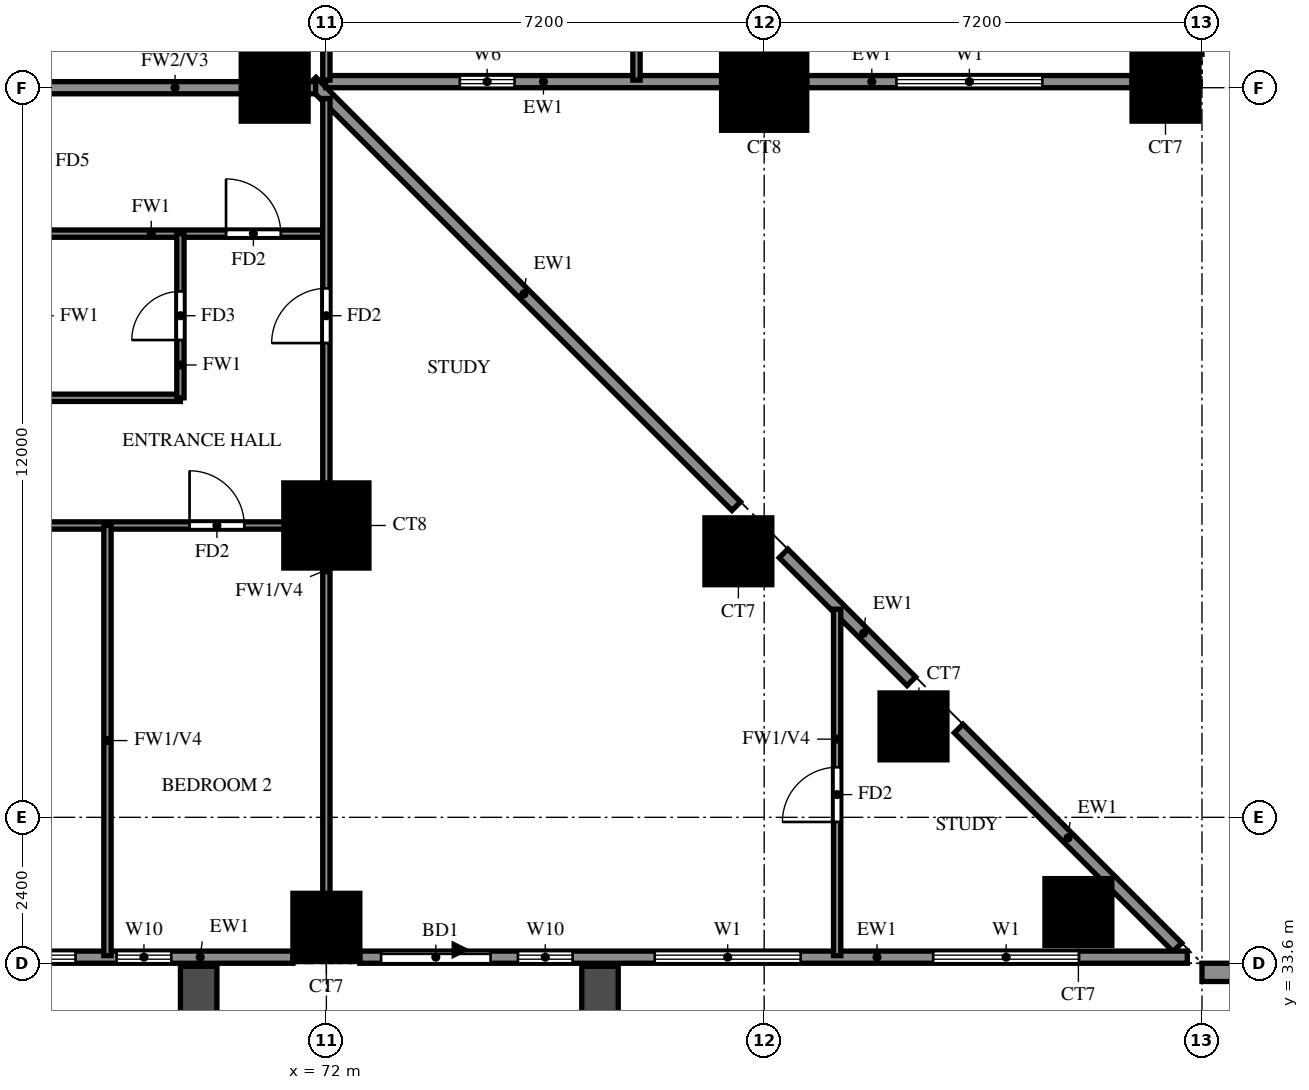
"""IFC4 building model, lengths in metres.
Left out: names, types, materials, properties, quantities, classifications, styles, units other than length and angle.
Written with IfcOpenShell. Run it as: python <this file> out.ifc"""

import sys

from ifc_helpers import new_model, si_unit, direction, frame, frame_2d, origin, origin_2d, place, context, subcontext, project, spatial, rectangle, extrude, source, transform, mapped, element, fill, save


model = new_model("IFC4")
c1 = context("Model", 3, precision=1e-05, world=origin(), true_north=direction((0.0, 1.0)))
c2 = subcontext(c1, "Body", "Model", "MODEL_VIEW")
j1 = project(units=[si_unit("LENGTHUNIT", "METRE"), si_unit("PLANEANGLEUNIT", "RADIAN")], contexts=[c1])
p1 = place(None, origin())
s1 = spatial("IfcSite", under=j1, at=p1, CompositionType="ELEMENT")
p2 = place(p1, origin())
s2 = spatial("IfcBuilding", under=s1, at=p2, CompositionType="ELEMENT")
p3 = place(p2, frame((0.0, 0.0, 30.5)))
s3 = spatial("IfcBuildingStorey", under=s2, at=p3, CompositionType="ELEMENT", Elevation=30.5)
m1 = source(origin(), c2, "Body", "SweptSolid", [
    extrude(rectangle(XDim=1.1, YDim=1.1, at=origin_2d()), origin(), (0.0, 0.0, 1.0), 3.18),
])
for number, where, z_axis, x_axis in (
    (1, (72.0, 34.2, 0.0), (0.0, 0.0, 1.0), (1.0, 0.0, 0.0)),
    (2, (84.367, 34.442, 0.0), (0.0, 0.0, 1.0), (1.0, 0.0, 0.0)),
    (3, (81.656, 37.496, 0.0), (0.0, 0.0, 1.0), (1.0, 0.0, 0.0)),
    (4, (78.776, 40.376, 0.0), (0.0, 0.0, 1.0), (1.0, 0.0, 0.0)),
):
    element("IfcColumn", number, at=place(p3, frame(where, z_axis=z_axis, x_axis=x_axis)), inside=s3, PredefinedType="COLUMN", context=c2, shape_type="MappedRepresentation", body=[
        mapped(m1, transform((0.0, 0.0, 0.0))),
    ])
m2 = source(origin(), c2, "Body", "SweptSolid", [
    extrude(rectangle(XDim=1.4, YDim=1.4, at=origin_2d()), origin(), (0.0, 0.0, 1.0), 3.18),
])
p4 = place(p3, frame((72.0, 40.8, 0.0), z_axis=(0.0, 0.0, 1.0), x_axis=(1.0, 0.0, 0.0)))
e5 = element("IfcColumn", 5, at=p4, inside=s3, PredefinedType="COLUMN", context=c2, shape_type="MappedRepresentation", body=[
    mapped(m2, transform((0.0, 0.0, 0.0))),
])
p5 = place(p3, frame((71.15, 48.0, 0.0), z_axis=(0.0, 0.0, 1.0), x_axis=(1.0, 0.0, 0.0)))
e6 = element("IfcColumn", 6, at=p5, inside=s3, PredefinedType="COLUMN", context=c2, shape_type="MappedRepresentation", body=[
    mapped(m1, transform((0.0, 0.0, 0.0))),
])
p6 = place(p3, frame((79.2, 48.0, 0.0), z_axis=(0.0, 0.0, 1.0), x_axis=(1.0, 0.0, 0.0)))
e7 = element("IfcColumn", 7, at=p6, inside=s3, PredefinedType="COLUMN", context=c2, shape_type="MappedRepresentation", body=[
    mapped(m2, transform((0.0, 0.0, 0.0))),
])
p7 = place(p3, frame((85.8, 48.0, 0.0), z_axis=(0.0, 0.0, 1.0), x_axis=(1.0, 0.0, 0.0)))
e8 = element("IfcColumn", 8, at=p7, inside=s3, PredefinedType="COLUMN", context=c2, shape_type="MappedRepresentation", body=[
    mapped(m1, transform((0.0, 0.0, 0.0))),
])
p8 = place(p3, frame((85.996, 33.863, 0.0), z_axis=(0.0, 0.0, 1.0), x_axis=(-0.7070827891, 0.707130772459, 0.0)))
e9 = element("IfcWall", 9, at=p8, inside=s3, PredefinedType="SOLIDWALL", context=c2, shape_type="SweptSolid", body=[
    extrude(rectangle(XDim=5.088, YDim=0.2, at=frame_2d((2.544, 0.0))), origin(), (0.0, 0.0, 1.0), 3.18),
])
p9 = place(p3, frame((81.62, 38.238, 0.0), z_axis=(0.0, 0.0, 1.0), x_axis=(-0.707106781187, 0.707106781187, 0.0)))
e10 = element("IfcWall", 10, at=p9, inside=s3, PredefinedType="SOLIDWALL", context=c2, shape_type="SweptSolid", body=[
    extrude(rectangle(XDim=2.973, YDim=0.2, at=frame_2d((1.486, 0.0))), origin(), (0.0, 0.0, 1.0), 3.18),
])
p10 = place(p3, frame((78.74, 41.118, 0.0), z_axis=(0.0, 0.0, 1.0), x_axis=(-0.707106781187, 0.707106781187, 0.0)))
e11 = element("IfcWall", 11, at=p10, inside=s3, PredefinedType="SOLIDWALL", context=c2, shape_type="SweptSolid", body=[
    extrude(rectangle(XDim=9.874, YDim=0.2, at=frame_2d((4.937, 0.0))), origin(), (0.0, 0.0, 1.0), 3.18),
])
p11 = place(p3, frame((71.989, 48.1, 0.0), z_axis=(0.0, 0.0, 1.0), x_axis=(1.0, 0.0, 0.0)))
e12 = element("IfcWall", 12, at=p11, inside=s3, PredefinedType="SOLIDWALL", context=c2, shape_type="SweptSolid", body=[
    extrude(rectangle(XDim=6.511, YDim=0.2, at=frame_2d((3.256, 0.0))), origin(), (0.0, 0.0, 1.0), 3.18),
])
p12 = place(p11, frame((2.206, 0.0, 1.5)))
e13 = element("IfcOpeningElement", 13, at=p12, cuts=e12, PredefinedType="OPENING", context=c2, shape_type="SweptSolid", body=[
    extrude(rectangle(XDim=0.9, YDim=0.9, at=frame_2d((0.45, 0.45))), frame((0.0, 0.11, 0.0), z_axis=(0.0, -1.0, 0.0), x_axis=(1.0, 0.0, 0.0)), (0.0, 0.0, 1.0), 0.22),
])
p13 = place(p3, frame((79.9, 48.1, 0.0), z_axis=(0.0, 0.0, 1.0), x_axis=(1.0, 0.0, 0.0)))
e14 = element("IfcWall", 14, at=p13, inside=s3, PredefinedType="SOLIDWALL", context=c2, shape_type="SweptSolid", body=[
    extrude(rectangle(XDim=5.35, YDim=0.2, at=frame_2d((2.675, 0.0))), origin(), (0.0, 0.0, 1.0), 3.18),
])
p14 = place(p13, frame((1.475, 0.0, 0.6)))
e15 = element("IfcOpeningElement", 15, at=p14, cuts=e14, PredefinedType="OPENING", context=c2, shape_type="SweptSolid", body=[
    extrude(rectangle(XDim=2.4, YDim=2.4, at=frame_2d((1.2, 1.2))), frame((0.0, 0.11, 0.0), z_axis=(0.0, -1.0, 0.0), x_axis=(1.0, 0.0, 0.0)), (0.0, 0.0, 1.0), 0.22),
])
p15 = place(p3, frame((86.3, 48.55, 0.0), z_axis=(0.0, 0.0, 1.0), x_axis=(0.0, 1.0, 0.0)))
e16 = element("IfcWall", 16, at=p15, inside=s3, PredefinedType="SOLIDWALL", context=c2, shape_type="SweptSolid", body=[
    extrude(rectangle(XDim=6.1, YDim=0.2, at=frame_2d((3.05, 0.0))), origin(), (0.0, 0.0, 1.0), 3.18),
])
p16 = place(p15, frame((0.725, 0.0, 0.6)))
e17 = element("IfcOpeningElement", 17, at=p16, cuts=e16, PredefinedType="OPENING", context=c2, shape_type="SweptSolid", body=[
    extrude(rectangle(XDim=1.8, YDim=2.4, at=frame_2d((0.9, 1.2))), frame((0.0, 0.11, 0.0), z_axis=(0.0, -1.0, 0.0), x_axis=(1.0, 0.0, 0.0)), (0.0, 0.0, 1.0), 0.22),
])
p17 = place(p15, frame((4.025, 0.0, 1.5)))
e18 = element("IfcOpeningElement", 18, at=p17, cuts=e16, PredefinedType="OPENING", context=c2, shape_type="SweptSolid", body=[
    extrude(rectangle(XDim=0.9, YDim=0.9, at=frame_2d((0.45, 0.45))), frame((0.0, 0.11, 0.0), z_axis=(0.0, -1.0, 0.0), x_axis=(1.0, 0.0, 0.0)), (0.0, 0.0, 1.0), 0.22),
])
p18 = place(p3, frame((65.35, 33.7, 0.0), z_axis=(0.0, 0.0, 1.0), x_axis=(1.0, 0.0, 0.0)))
e19 = element("IfcWall", 19, at=p18, inside=s3, PredefinedType="SOLIDWALL", context=c2, shape_type="SweptSolid", body=[
    extrude(rectangle(XDim=6.1, YDim=0.2, at=frame_2d((3.05, 0.0))), origin(), (0.0, 0.0, 1.0), 3.18),
])
p19 = place(p18, frame((3.2, 0.0, 0.6)))
e20 = element("IfcOpeningElement", 20, at=p19, cuts=e19, PredefinedType="OPENING", context=c2, shape_type="SweptSolid", body=[
    extrude(rectangle(XDim=0.9, YDim=2.4, at=frame_2d((0.45, 1.2))), frame((0.0, 0.11, 0.0), z_axis=(0.0, -1.0, 0.0), x_axis=(1.0, 0.0, 0.0)), (0.0, 0.0, 1.0), 0.22),
])
p20 = place(p18, frame((0.725, 0.0, 0.6)))
e21 = element("IfcOpeningElement", 21, at=p20, cuts=e19, PredefinedType="OPENING", context=c2, shape_type="SweptSolid", body=[
    extrude(rectangle(XDim=1.8, YDim=2.4, at=frame_2d((0.9, 1.2))), frame((0.0, 0.11, 0.0), z_axis=(0.0, -1.0, 0.0), x_axis=(1.0, 0.0, 0.0)), (0.0, 0.0, 1.0), 0.22),
])
p21 = place(p3, frame((72.55, 33.7, 0.0), z_axis=(0.0, 0.0, 1.0), x_axis=(1.0, 0.0, 0.0)))
e22 = element("IfcWall", 22, at=p21, inside=s3, PredefinedType="SOLIDWALL", context=c2, shape_type="SweptSolid", body=[
    extrude(rectangle(XDim=13.609, YDim=0.2, at=frame_2d((6.804, 0.0))), origin(), (0.0, 0.0, 1.0), 3.18),
])
p22 = place(p21, frame((0.35, 0.0, 0.0)))
e23 = element("IfcOpeningElement", 23, at=p22, cuts=e22, PredefinedType="OPENING", context=c2, shape_type="SweptSolid", body=[
    extrude(rectangle(XDim=1.8, YDim=2.4, at=frame_2d((0.9, 1.2))), frame((0.0, 0.11, 0.0), z_axis=(0.0, -1.0, 0.0), x_axis=(1.0, 0.0, 0.0)), (0.0, 0.0, 1.0), 0.22),
])
p23 = place(p21, frame((2.6, 0.0, 0.6)))
e24 = element("IfcOpeningElement", 24, at=p23, cuts=e22, PredefinedType="OPENING", context=c2, shape_type="SweptSolid", body=[
    extrude(rectangle(XDim=0.9, YDim=2.4, at=frame_2d((0.45, 1.2))), frame((0.0, 0.11, 0.0), z_axis=(0.0, -1.0, 0.0), x_axis=(1.0, 0.0, 0.0)), (0.0, 0.0, 1.0), 0.22),
])
p24 = place(p21, frame((4.85, 0.0, 0.6)))
e25 = element("IfcOpeningElement", 25, at=p24, cuts=e22, PredefinedType="OPENING", context=c2, shape_type="SweptSolid", body=[
    extrude(rectangle(XDim=2.4, YDim=2.4, at=frame_2d((1.2, 1.2))), frame((0.0, 0.11, 0.0), z_axis=(0.0, -1.0, 0.0), x_axis=(1.0, 0.0, 0.0)), (0.0, 0.0, 1.0), 0.22),
])
p25 = place(p21, frame((9.429, 0.0, 0.6)))
e26 = element("IfcOpeningElement", 26, at=p25, cuts=e22, PredefinedType="OPENING", context=c2, shape_type="SweptSolid", body=[
    extrude(rectangle(XDim=2.4, YDim=2.4, at=frame_2d((1.2, 1.2))), frame((0.0, 0.11, 0.0), z_axis=(0.0, -1.0, 0.0), x_axis=(1.0, 0.0, 0.0)), (0.0, 0.0, 1.0), 0.22),
])
p26 = place(p3, frame((86.4, 33.45, -0.32), z_axis=(0.0, 0.0, 1.0), x_axis=(1.0, 0.0, 0.0)))
e27 = element("IfcWall", 27, at=p26, inside=s3, PredefinedType="SOLIDWALL", context=c2, shape_type="SweptSolid", body=[
    extrude(rectangle(XDim=2.4, YDim=0.3, at=frame_2d((1.2, 0.0))), origin(), (0.0, 0.0, 1.0), 3.5),
])
for number, where, z_axis, x_axis in (
    (28, (69.9, 33.55, 0.0), (0.0, 0.0, 1.0), (0.0, -1.0, 0.0)),
    (29, (76.5, 33.55, 0.0), (0.0, 0.0, 1.0), (0.0, -1.0, 0.0)),
):
    element("IfcWall", number, at=place(p3, frame(where, z_axis=z_axis, x_axis=x_axis)), inside=s3, PredefinedType="SOLIDWALL", context=c2, shape_type="SweptSolid", body=[
        extrude(rectangle(XDim=2.65, YDim=0.6, at=frame_2d((1.325, 0.0))), origin(), (0.0, 0.0, 1.0), 2.85),
    ])
p27 = place(p3, frame((67.2, 48.0, 0.0), z_axis=(0.0, 0.0, 1.0), x_axis=(1.0, 0.0, 0.0)))
e30 = element("IfcWall", 30, at=p27, inside=s3, PredefinedType="SOLIDWALL", context=c2, shape_type="SweptSolid", body=[
    extrude(rectangle(XDim=4.623, YDim=0.2, at=frame_2d((2.312, 0.0))), origin(), (0.0, 0.0, 1.0), 3.18),
])
p28 = place(p3, frame((60.0, 40.8, 0.0), z_axis=(0.0, 0.0, 1.0), x_axis=(1.0, 0.0, 0.0)))
e31 = element("IfcWall", 31, at=p28, inside=s3, PredefinedType="PARTITIONING", context=c2, shape_type="SweptSolid", body=[
    extrude(rectangle(XDim=12.0, YDim=0.12, at=frame_2d((6.0, 0.0))), origin(), (0.0, 0.0, 1.0), 3.18),
])
p29 = place(p28, frame((9.75, 0.0, 0.0)))
e32 = element("IfcOpeningElement", 32, at=p29, cuts=e31, PredefinedType="OPENING", context=c2, shape_type="SweptSolid", body=[
    extrude(rectangle(XDim=0.9, YDim=2.1, at=frame_2d((0.45, 1.05))), frame((0.0, 0.07, 0.0), z_axis=(0.0, -1.0, 0.0), x_axis=(1.0, 0.0, 0.0)), (0.0, 0.0, 1.0), 0.14),
])
p30 = place(p28, frame((2.55, 0.0, 0.0)))
e33 = element("IfcOpeningElement", 33, at=p30, cuts=e31, PredefinedType="OPENING", context=c2, shape_type="SweptSolid", body=[
    extrude(rectangle(XDim=1.5, YDim=2.1, at=frame_2d((0.75, 1.05))), frame((0.0, 0.07, 0.0), z_axis=(0.0, -1.0, 0.0), x_axis=(1.0, 0.0, 0.0)), (0.0, 0.0, 1.0), 0.14),
])
p31 = place(p3, frame((60.0, 42.9, 0.0), z_axis=(0.0, 0.0, 1.0), x_axis=(1.0, 0.0, 0.0)))
e34 = element("IfcWall", 34, at=p31, inside=s3, PredefinedType="PARTITIONING", context=c2, shape_type="SweptSolid", body=[
    extrude(rectangle(XDim=9.6, YDim=0.12, at=frame_2d((4.8, 0.0))), origin(), (0.0, 0.0, 1.0), 3.18),
])
p32 = place(p31, frame((4.4, 0.0, 0.0)))
e35 = element("IfcOpeningElement", 35, at=p32, cuts=e34, PredefinedType="OPENING", context=c2, shape_type="SweptSolid", body=[
    extrude(rectangle(XDim=0.9, YDim=2.1, at=frame_2d((0.45, 1.05))), frame((0.0, 0.07, 0.0), z_axis=(0.0, -1.0, 0.0), x_axis=(1.0, 0.0, 0.0)), (0.0, 0.0, 1.0), 0.14),
])
p33 = place(p31, frame((0.825, 0.0, 0.0)))
e36 = element("IfcOpeningElement", 36, at=p33, cuts=e34, PredefinedType="OPENING", context=c2, shape_type="SweptSolid", body=[
    extrude(rectangle(XDim=0.8, YDim=2.1, at=frame_2d((0.4, 1.05))), frame((0.0, 0.07, 0.0), z_axis=(0.0, -1.0, 0.0), x_axis=(1.0, 0.0, 0.0)), (0.0, 0.0, 1.0), 0.14),
])
p34 = place(p3, frame((67.2, 45.6, 0.0), z_axis=(0.0, 0.0, 1.0), x_axis=(1.0, 0.0, 0.0)))
e37 = element("IfcWall", 37, at=p34, inside=s3, PredefinedType="PARTITIONING", context=c2, shape_type="SweptSolid", body=[
    extrude(rectangle(XDim=4.8, YDim=0.12, at=frame_2d((2.4, 0.0))), origin(), (0.0, 0.0, 1.0), 3.18),
])
p35 = place(p34, frame((3.15, 0.0, 0.0)))
e38 = element("IfcOpeningElement", 38, at=p35, cuts=e37, PredefinedType="OPENING", context=c2, shape_type="SweptSolid", body=[
    extrude(rectangle(XDim=0.9, YDim=2.1, at=frame_2d((0.45, 1.05))), frame((0.0, 0.07, 0.0), z_axis=(0.0, -1.0, 0.0), x_axis=(1.0, 0.0, 0.0)), (0.0, 0.0, 1.0), 0.14),
])
p36 = place(p3, frame((68.4, 33.725, 0.0), z_axis=(0.0, 0.0, 1.0), x_axis=(0.0, 1.0, 0.0)))
e39 = element("IfcWall", 39, at=p36, inside=s3, PredefinedType="PARTITIONING", context=c2, shape_type="SweptSolid", body=[
    extrude(rectangle(XDim=7.075, YDim=0.12, at=frame_2d((3.538, 0.0))), origin(), (0.0, 0.0, 1.0), 2.28),
])
p37 = place(p3, frame((69.6, 42.9, 0.0), z_axis=(0.0, 0.0, 1.0), x_axis=(0.0, 1.0, 0.0)))
e40 = element("IfcWall", 40, at=p37, inside=s3, PredefinedType="PARTITIONING", context=c2, shape_type="SweptSolid", body=[
    extrude(rectangle(XDim=2.7, YDim=0.12, at=frame_2d((1.35, 0.0))), origin(), (0.0, 0.0, 1.0), 3.18),
])
p38 = place(p37, frame((0.95, 0.0, 0.0)))
e41 = element("IfcOpeningElement", 41, at=p38, cuts=e40, PredefinedType="OPENING", context=c2, shape_type="SweptSolid", body=[
    extrude(rectangle(XDim=0.8, YDim=2.1, at=frame_2d((0.4, 1.05))), frame((0.0, 0.07, 0.0), z_axis=(0.0, -1.0, 0.0), x_axis=(1.0, 0.0, 0.0)), (0.0, 0.0, 1.0), 0.14),
])
p39 = place(p3, frame((72.0, 33.725, 0.0), z_axis=(0.0, 0.0, 1.0), x_axis=(0.0, 1.0, 0.0)))
e42 = element("IfcWall", 42, at=p39, inside=s3, PredefinedType="PARTITIONING", context=c2, shape_type="SweptSolid", body=[
    extrude(rectangle(XDim=14.098, YDim=0.12, at=frame_2d((7.049, 0.0))), origin(), (0.0, 0.0, 1.0), 2.28),
])
p40 = place(p39, frame((10.075, 0.0, 0.0)))
e43 = element("IfcOpeningElement", 43, at=p40, cuts=e42, PredefinedType="OPENING", context=c2, shape_type="SweptSolid", body=[
    extrude(rectangle(XDim=0.9, YDim=2.1, at=frame_2d((0.45, 1.05))), frame((0.0, 0.07, 0.0), z_axis=(0.0, -1.0, 0.0), x_axis=(1.0, 0.0, 0.0)), (0.0, 0.0, 1.0), 0.14),
])
for number, where, z_axis, x_axis in (
    (44, (72.0, 48.125, 0.0), (0.0, 0.0, 1.0), (0.0, 1.0, 0.0)),
    (45, (77.1, 48.125, 0.0), (0.0, 0.0, 1.0), (0.0, 1.0, 0.0)),
):
    element("IfcWall", number, at=place(p3, frame(where, z_axis=z_axis, x_axis=x_axis)), inside=s3, PredefinedType="PARTITIONING", context=c2, shape_type="SweptSolid", body=[
        extrude(rectangle(XDim=3.475, YDim=0.12, at=frame_2d((1.738, 0.0))), origin(), (0.0, 0.0, 1.0), 3.18),
    ])
p41 = place(p3, frame((79.2, 48.125, 0.0), z_axis=(0.0, 0.0, 1.0), x_axis=(0.0, 1.0, 0.0)))
e46 = element("IfcWall", 46, at=p41, inside=s3, PredefinedType="PARTITIONING", context=c2, shape_type="SweptSolid", body=[
    extrude(rectangle(XDim=3.475, YDim=0.12, at=frame_2d((1.738, 0.0))), origin(), (0.0, 0.0, 1.0), 3.18),
])
p42 = place(p41, frame((1.288, 0.0, 0.0)))
e47 = element("IfcOpeningElement", 47, at=p42, cuts=e46, PredefinedType="OPENING", context=c2, shape_type="SweptSolid", body=[
    extrude(rectangle(XDim=0.9, YDim=2.1, at=frame_2d((0.45, 1.05))), frame((0.0, 0.07, 0.0), z_axis=(0.0, -1.0, 0.0), x_axis=(1.0, 0.0, 0.0)), (0.0, 0.0, 1.0), 0.14),
])
p43 = place(p3, frame((80.4, 33.725, 0.0), z_axis=(0.0, 0.0, 1.0), x_axis=(0.0, 1.0, 0.0)))
e48 = element("IfcWall", 48, at=p43, inside=s3, PredefinedType="PARTITIONING", context=c2, shape_type="SweptSolid", body=[
    extrude(rectangle(XDim=5.698, YDim=0.12, at=frame_2d((2.849, 0.0))), origin(), (0.0, 0.0, 1.0), 2.28),
])
p44 = place(p43, frame((2.199, 0.0, 0.0)))
e49 = element("IfcOpeningElement", 49, at=p44, cuts=e48, PredefinedType="OPENING", context=c2, shape_type="SweptSolid", body=[
    extrude(rectangle(XDim=0.9, YDim=2.1, at=frame_2d((0.45, 1.05))), frame((0.0, 0.07, 0.0), z_axis=(0.0, -1.0, 0.0), x_axis=(1.0, 0.0, 0.0)), (0.0, 0.0, 1.0), 0.14),
])
p45 = place(p12, origin())
e50 = element("IfcWindow", 50, at=p45, inside=s3, PartitioningType="SINGLE_PANEL", PredefinedType="WINDOW", context=c2, shape_type="SweptSolid", body=[
    extrude(rectangle(XDim=0.9, YDim=0.9, at=frame_2d((0.45, 0.45))), frame((0.0, 0.03, 0.0), z_axis=(0.0, -1.0, 0.0), x_axis=(1.0, 0.0, 0.0)), (0.0, 0.0, 1.0), 0.06),
])
fill(e13, e50)
p46 = place(p14, origin())
e51 = element("IfcWindow", 51, at=p46, inside=s3, PartitioningType="DOUBLE_PANEL_VERTICAL", PredefinedType="WINDOW", context=c2, shape_type="SweptSolid", body=[
    extrude(rectangle(XDim=2.4, YDim=2.4, at=frame_2d((1.2, 1.2))), frame((0.0, 0.03, 0.0), z_axis=(0.0, -1.0, 0.0), x_axis=(1.0, 0.0, 0.0)), (0.0, 0.0, 1.0), 0.06),
])
fill(e15, e51)
p47 = place(p19, origin())
e52 = element("IfcWindow", 52, at=p47, inside=s3, PartitioningType="SINGLE_PANEL", PredefinedType="WINDOW", context=c2, shape_type="SweptSolid", body=[
    extrude(rectangle(XDim=0.9, YDim=2.4, at=frame_2d((0.45, 1.2))), frame((0.0, 0.03, 0.0), z_axis=(0.0, -1.0, 0.0), x_axis=(1.0, 0.0, 0.0)), (0.0, 0.0, 1.0), 0.06),
])
fill(e20, e52)
p48 = place(p20, origin())
e53 = element("IfcWindow", 53, at=p48, inside=s3, PartitioningType="DOUBLE_PANEL_VERTICAL", PredefinedType="WINDOW", context=c2, shape_type="SweptSolid", body=[
    extrude(rectangle(XDim=1.8, YDim=2.4, at=frame_2d((0.9, 1.2))), frame((0.0, 0.03, 0.0), z_axis=(0.0, -1.0, 0.0), x_axis=(1.0, 0.0, 0.0)), (0.0, 0.0, 1.0), 0.06),
])
fill(e21, e53)
p49 = place(p22, origin())
e54 = element("IfcDoor", 54, at=p49, inside=s3, OperationType="DOUBLE_DOOR_SLIDING", PredefinedType="DOOR", context=c2, shape_type="SweptSolid", body=[
    extrude(rectangle(XDim=1.8, YDim=2.4, at=frame_2d((0.9, 1.2))), frame((0.0, 0.025, 0.0), z_axis=(0.0, -1.0, 0.0), x_axis=(1.0, 0.0, 0.0)), (0.0, 0.0, 1.0), 0.05),
])
fill(e23, e54)
p50 = place(p23, origin())
e55 = element("IfcWindow", 55, at=p50, inside=s3, PartitioningType="SINGLE_PANEL", PredefinedType="WINDOW", context=c2, shape_type="SweptSolid", body=[
    extrude(rectangle(XDim=0.9, YDim=2.4, at=frame_2d((0.45, 1.2))), frame((0.0, 0.03, 0.0), z_axis=(0.0, -1.0, 0.0), x_axis=(1.0, 0.0, 0.0)), (0.0, 0.0, 1.0), 0.06),
])
fill(e24, e55)
p51 = place(p24, origin())
e56 = element("IfcWindow", 56, at=p51, inside=s3, PartitioningType="DOUBLE_PANEL_VERTICAL", PredefinedType="WINDOW", context=c2, shape_type="SweptSolid", body=[
    extrude(rectangle(XDim=2.4, YDim=2.4, at=frame_2d((1.2, 1.2))), frame((0.0, 0.03, 0.0), z_axis=(0.0, -1.0, 0.0), x_axis=(1.0, 0.0, 0.0)), (0.0, 0.0, 1.0), 0.06),
])
fill(e25, e56)
p52 = place(p25, origin())
e57 = element("IfcWindow", 57, at=p52, inside=s3, PartitioningType="DOUBLE_PANEL_VERTICAL", PredefinedType="WINDOW", context=c2, shape_type="SweptSolid", body=[
    extrude(rectangle(XDim=2.4, YDim=2.4, at=frame_2d((1.2, 1.2))), frame((0.0, 0.03, 0.0), z_axis=(0.0, -1.0, 0.0), x_axis=(1.0, 0.0, 0.0)), (0.0, 0.0, 1.0), 0.06),
])
fill(e26, e57)
p53 = place(p35, origin())
e58 = element("IfcDoor", 58, at=p53, inside=s3, OperationType="SINGLE_SWING_LEFT", PredefinedType="DOOR", context=c2, shape_type="SweptSolid", body=[
    extrude(rectangle(XDim=0.9, YDim=2.1, at=frame_2d((0.45, 1.05))), frame((0.0, 0.025, 0.0), z_axis=(0.0, -1.0, 0.0), x_axis=(1.0, 0.0, 0.0)), (0.0, 0.0, 1.0), 0.05),
])
fill(e38, e58)
p54 = place(p29, origin())
e59 = element("IfcDoor", 59, at=p54, inside=s3, OperationType="SINGLE_SWING_RIGHT", PredefinedType="DOOR", context=c2, shape_type="SweptSolid", body=[
    extrude(rectangle(XDim=0.9, YDim=2.1, at=frame_2d((0.45, 1.05))), frame((0.0, 0.025, 0.0), z_axis=(0.0, -1.0, 0.0), x_axis=(1.0, 0.0, 0.0)), (0.0, 0.0, 1.0), 0.05),
])
fill(e32, e59)
p55 = place(p38, origin())
e60 = element("IfcDoor", 60, at=p55, inside=s3, OperationType="SINGLE_SWING_LEFT", PredefinedType="DOOR", context=c2, shape_type="SweptSolid", body=[
    extrude(rectangle(XDim=0.8, YDim=2.1, at=frame_2d((0.4, 1.05))), frame((0.0, 0.025, 0.0), z_axis=(0.0, -1.0, 0.0), x_axis=(1.0, 0.0, 0.0)), (0.0, 0.0, 1.0), 0.05),
])
fill(e41, e60)
p56 = place(p40, origin())
e61 = element("IfcDoor", 61, at=p56, inside=s3, OperationType="SINGLE_SWING_LEFT", PredefinedType="DOOR", context=c2, shape_type="SweptSolid", body=[
    extrude(rectangle(XDim=0.9, YDim=2.1, at=frame_2d((0.45, 1.05))), frame((0.0, 0.025, 0.0), z_axis=(0.0, -1.0, 0.0), x_axis=(1.0, 0.0, 0.0)), (0.0, 0.0, 1.0), 0.05),
])
fill(e43, e61)
p57 = place(p44, origin())
e62 = element("IfcDoor", 62, at=p57, inside=s3, OperationType="SINGLE_SWING_LEFT", PredefinedType="DOOR", context=c2, shape_type="SweptSolid", body=[
    extrude(rectangle(XDim=0.9, YDim=2.1, at=frame_2d((0.45, 1.05))), frame((0.0, 0.025, 0.0), z_axis=(0.0, -1.0, 0.0), x_axis=(1.0, 0.0, 0.0)), (0.0, 0.0, 1.0), 0.05),
])
fill(e49, e62)
save(model, sys.argv[1])
